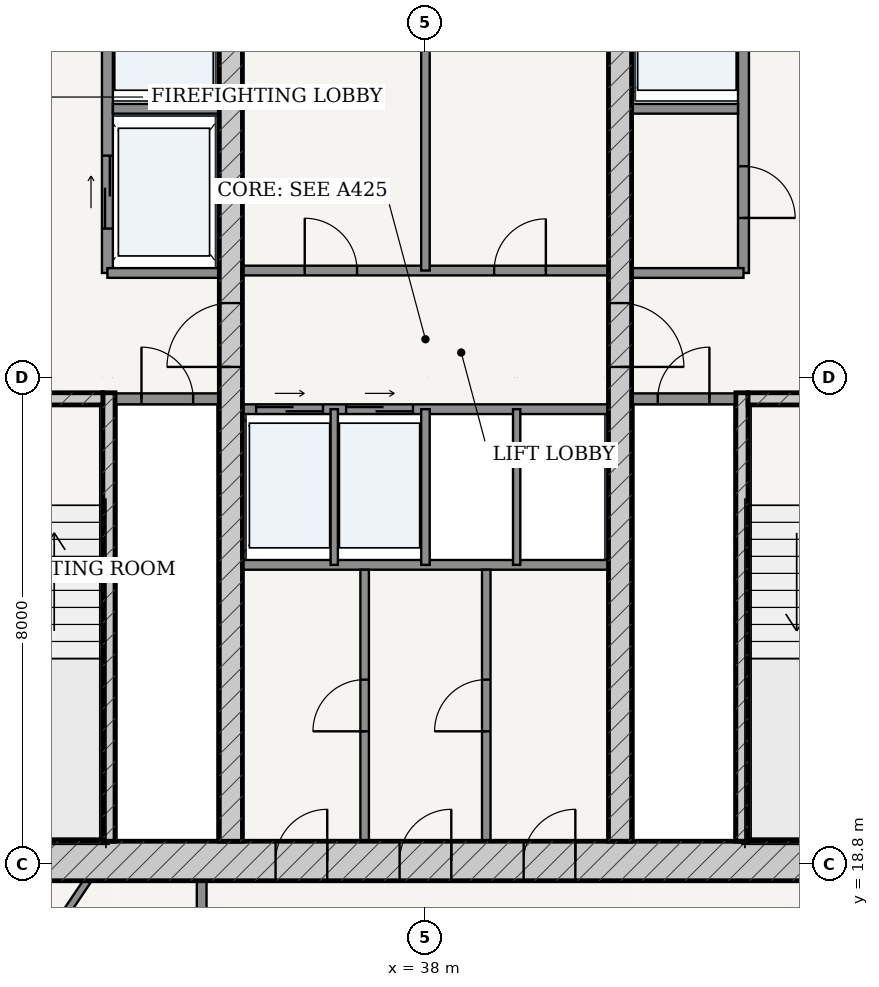
"""IFC4 building model, lengths in metres.
Left out: names, types, materials, properties, quantities, classifications, styles, units other than length and angle.
Written with IfcOpenShell. Run it as: python <this file> out.ifc"""

import sys

from ifc_helpers import new_model, si_unit, direction, frame, frame_2d, origin, place, context, subcontext, project, spatial, rectangle, extrude, source, transform, mapped, element, fill, save


model = new_model("IFC4")
c1 = context("Model", 3, precision=1e-05, world=origin(), true_north=direction((-0.2419218956, 0.970295726276)))
c2 = subcontext(c1, "Body", "Model", "MODEL_VIEW")
j1 = project(units=[si_unit("LENGTHUNIT", "METRE"), si_unit("PLANEANGLEUNIT", "RADIAN")], contexts=[c1])
p1 = place(None, origin())
s1 = spatial("IfcSite", under=j1, at=p1, CompositionType="ELEMENT")
p2 = place(p1, origin())
s2 = spatial("IfcBuilding", under=s1, at=p2, CompositionType="ELEMENT")
p3 = place(p2, frame((0.0, 0.0, 167.8)))
s3 = spatial("IfcBuildingStorey", under=s2, at=p3, CompositionType="ELEMENT", Elevation=167.8)
p4 = place(p3, frame((28.725, 18.85, 0.0), z_axis=(0.0, 0.0, 1.0), x_axis=(1.0, 0.0, 0.0)))
e1 = element("IfcWall", 1, at=p4, inside=s3, PredefinedType="SHEAR", context=c2, shape_type="SweptSolid", body=[
    extrude(rectangle(XDim=18.55, YDim=0.65, at=frame_2d((9.275, 0.0))), origin(), (0.0, 0.0, 1.0), 3.33),
])
p5 = place(p4, frame((6.81, 0.0, 0.0)))
e2 = element("IfcOpeningElement", 2, at=p5, cuts=e1, PredefinedType="OPENING", context=c2, shape_type="SweptSolid", body=[
    extrude(rectangle(XDim=0.85, YDim=2.1, at=frame_2d((0.425, 1.05))), frame((0.0, 0.335, 0.0), z_axis=(0.0, -1.0, 0.0), x_axis=(1.0, 0.0, 0.0)), (0.0, 0.0, 1.0), 0.67),
])
p6 = place(p4, frame((8.85, 0.0, 0.0)))
e3 = element("IfcOpeningElement", 3, at=p6, cuts=e1, PredefinedType="OPENING", context=c2, shape_type="SweptSolid", body=[
    extrude(rectangle(XDim=0.85, YDim=2.1, at=frame_2d((0.425, 1.05))), frame((0.0, 0.335, 0.0), z_axis=(0.0, -1.0, 0.0), x_axis=(1.0, 0.0, 0.0)), (0.0, 0.0, 1.0), 0.67),
])
p7 = place(p4, frame((10.89, 0.0, 0.0)))
e4 = element("IfcOpeningElement", 4, at=p7, cuts=e1, PredefinedType="OPENING", context=c2, shape_type="SweptSolid", body=[
    extrude(rectangle(XDim=0.85, YDim=2.1, at=frame_2d((0.425, 1.05))), frame((0.0, 0.335, 0.0), z_axis=(0.0, -1.0, 0.0), x_axis=(1.0, 0.0, 0.0)), (0.0, 0.0, 1.0), 0.67),
])
p8 = place(p3, frame((32.795, 19.175, 0.0), z_axis=(0.0, 0.0, 1.0), x_axis=(0.0, 1.0, 0.0)))
e5 = element("IfcWall", 5, at=p8, inside=s3, PredefinedType="SOLIDWALL", context=c2, shape_type="SweptSolid", body=[
    extrude(rectangle(XDim=7.375, YDim=0.2, at=frame_2d((3.688, 0.0))), origin(), (0.0, 0.0, 1.0), 3.33),
])
p9 = place(p3, frame((29.375, 26.45, 0.0), z_axis=(0.0, 0.0, 1.0), x_axis=(1.0, 0.0, 0.0)))
e6 = element("IfcWall", 6, at=p9, inside=s3, PredefinedType="SOLIDWALL", context=c2, shape_type="SweptSolid", body=[
    extrude(rectangle(XDim=3.32, YDim=0.2, at=frame_2d((1.66, 0.0))), origin(), (0.0, 0.0, 1.0), 3.33),
])
p10 = place(p9, frame((1.185, 0.0, 0.0)))
e7 = element("IfcOpeningElement", 7, at=p10, cuts=e6, PredefinedType="OPENING", context=c2, shape_type="SweptSolid", body=[
    extrude(rectangle(XDim=0.95, YDim=2.15, at=frame_2d((0.475, 1.075))), frame((0.0, 0.11, 0.0), z_axis=(0.0, -1.0, 0.0), x_axis=(1.0, 0.0, 0.0)), (0.0, 0.0, 1.0), 0.22),
])
p11 = place(p3, frame((43.205, 19.175, 0.0), z_axis=(0.0, 0.0, 1.0), x_axis=(0.0, 1.0, 0.0)))
e8 = element("IfcWall", 8, at=p11, inside=s3, PredefinedType="SOLIDWALL", context=c2, shape_type="SweptSolid", body=[
    extrude(rectangle(XDim=7.375, YDim=0.2, at=frame_2d((3.688, 0.0))), origin(), (0.0, 0.0, 1.0), 3.33),
])
p12 = place(p3, frame((43.305, 26.45, 0.0), z_axis=(0.0, 0.0, 1.0), x_axis=(1.0, 0.0, 0.0)))
e9 = element("IfcWall", 9, at=p12, inside=s3, PredefinedType="SOLIDWALL", context=c2, shape_type="SweptSolid", body=[
    extrude(rectangle(XDim=3.32, YDim=0.2, at=frame_2d((1.66, 0.0))), origin(), (0.0, 0.0, 1.0), 3.33),
])
p13 = place(p12, frame((1.185, 0.0, 0.0)))
e10 = element("IfcOpeningElement", 10, at=p13, cuts=e9, PredefinedType="OPENING", context=c2, shape_type="SweptSolid", body=[
    extrude(rectangle(XDim=0.95, YDim=2.15, at=frame_2d((0.475, 1.075))), frame((0.0, 0.11, 0.0), z_axis=(0.0, -1.0, 0.0), x_axis=(1.0, 0.0, 0.0)), (0.0, 0.0, 1.0), 0.22),
])
p14 = place(p3, frame((34.8, 19.175, 0.0), z_axis=(0.0, 0.0, 1.0), x_axis=(0.0, 1.0, 0.0)))
e11 = element("IfcWall", 11, at=p14, inside=s3, PredefinedType="SHEAR", context=c2, shape_type="SweptSolid", body=[
    extrude(rectangle(XDim=15.25, YDim=0.38, at=frame_2d((7.625, 0.0))), origin(), (0.0, 0.0, 1.0), 3.33),
])
p15 = place(p14, frame((7.8, 0.0, 0.0)))
e12 = element("IfcOpeningElement", 12, at=p15, cuts=e11, PredefinedType="OPENING", context=c2, shape_type="SweptSolid", body=[
    extrude(rectangle(XDim=1.05, YDim=2.15, at=frame_2d((0.525, 1.075))), frame((0.0, 0.2, 0.0), z_axis=(0.0, -1.0, 0.0), x_axis=(1.0, 0.0, 0.0)), (0.0, 0.0, 1.0), 0.4),
])
p16 = place(p3, frame((41.2, 19.175, 0.0), z_axis=(0.0, 0.0, 1.0), x_axis=(0.0, 1.0, 0.0)))
e13 = element("IfcWall", 13, at=p16, inside=s3, PredefinedType="SHEAR", context=c2, shape_type="SweptSolid", body=[
    extrude(rectangle(XDim=15.25, YDim=0.38, at=frame_2d((7.625, 0.0))), origin(), (0.0, 0.0, 1.0), 3.33),
])
p17 = place(p16, frame((7.8, 0.0, 0.0)))
e14 = element("IfcOpeningElement", 14, at=p17, cuts=e13, PredefinedType="OPENING", context=c2, shape_type="SweptSolid", body=[
    extrude(rectangle(XDim=1.05, YDim=2.15, at=frame_2d((0.525, 1.075))), frame((0.0, 0.2, 0.0), z_axis=(0.0, -1.0, 0.0), x_axis=(1.0, 0.0, 0.0)), (0.0, 0.0, 1.0), 0.4),
])
p18 = place(p3, frame((32.9, 26.45, 0.0), z_axis=(0.0, 0.0, 1.0), x_axis=(1.0, 0.0, 0.0)))
e15 = element("IfcWall", 15, at=p18, inside=s3, PredefinedType="PARTITIONING", context=c2, shape_type="SweptSolid", body=[
    extrude(rectangle(XDim=1.71, YDim=0.18, at=frame_2d((0.855, 0.0))), origin(), (0.0, 0.0, 1.0), 3.33),
])
p19 = place(p18, frame((0.43, 0.0, 0.0)))
e16 = element("IfcOpeningElement", 16, at=p19, cuts=e15, PredefinedType="OPENING", context=c2, shape_type="SweptSolid", body=[
    extrude(rectangle(XDim=0.85, YDim=2.1, at=frame_2d((0.425, 1.05))), frame((0.0, 0.1, 0.0), z_axis=(0.0, -1.0, 0.0), x_axis=(1.0, 0.0, 0.0)), (0.0, 0.0, 1.0), 0.2),
])
p20 = place(p3, frame((41.39, 26.45, 0.0), z_axis=(0.0, 0.0, 1.0), x_axis=(1.0, 0.0, 0.0)))
e17 = element("IfcWall", 17, at=p20, inside=s3, PredefinedType="PARTITIONING", context=c2, shape_type="SweptSolid", body=[
    extrude(rectangle(XDim=1.71, YDim=0.18, at=frame_2d((0.855, 0.0))), origin(), (0.0, 0.0, 1.0), 3.33),
])
p21 = place(p20, frame((0.43, 0.0, 0.0)))
e18 = element("IfcOpeningElement", 18, at=p21, cuts=e17, PredefinedType="OPENING", context=c2, shape_type="SweptSolid", body=[
    extrude(rectangle(XDim=0.85, YDim=2.1, at=frame_2d((0.425, 1.05))), frame((0.0, 0.1, 0.0), z_axis=(0.0, -1.0, 0.0), x_axis=(1.0, 0.0, 0.0)), (0.0, 0.0, 1.0), 0.2),
])
p22 = place(p3, frame((32.77, 28.52, 0.0), z_axis=(0.0, 0.0, 1.0), x_axis=(0.0, 1.0, 0.0)))
e19 = element("IfcWall", 19, at=p22, inside=s3, PredefinedType="PARTITIONING", context=c2, shape_type="SweptSolid", body=[
    extrude(rectangle(XDim=5.905, YDim=0.18, at=frame_2d((2.953, 0.0))), origin(), (0.0, 0.0, 1.0), 3.33),
])
p23 = place(p22, frame((3.655, 0.0, 0.0)))
e20 = element("IfcOpeningElement", 20, at=p23, cuts=e19, PredefinedType="OPENING", context=c2, shape_type="SweptSolid", body=[
    extrude(rectangle(XDim=1.15, YDim=2.2, at=frame_2d((0.575, 1.1))), frame((0.0, 0.1, 0.0), z_axis=(0.0, -1.0, 0.0), x_axis=(1.0, 0.0, 0.0)), (0.0, 0.0, 1.0), 0.2),
])
p24 = place(p22, frame((0.73, 0.0, 0.0)))
e21 = element("IfcOpeningElement", 21, at=p24, cuts=e19, PredefinedType="OPENING", context=c2, shape_type="SweptSolid", body=[
    extrude(rectangle(XDim=1.2, YDim=2.25, at=frame_2d((0.6, 1.125))), frame((0.0, 0.1, 0.0), z_axis=(0.0, -1.0, 0.0), x_axis=(1.0, 0.0, 0.0)), (0.0, 0.0, 1.0), 0.2),
])
p25 = place(p3, frame((32.86, 31.22, 0.0), z_axis=(0.0, 0.0, 1.0), x_axis=(1.0, 0.0, 0.0)))
e22 = element("IfcWall", 22, at=p25, inside=s3, PredefinedType="PARTITIONING", context=c2, shape_type="SweptSolid", body=[
    extrude(rectangle(XDim=1.75, YDim=0.16, at=frame_2d((0.875, 0.0))), origin(), (0.0, 0.0, 1.0), 3.33),
])
p26 = place(p3, frame((32.77, 28.52, 0.0), z_axis=(0.0, 0.0, 1.0), x_axis=(1.0, 0.0, 0.0)))
e23 = element("IfcWall", 23, at=p26, inside=s3, PredefinedType="PARTITIONING", context=c2, shape_type="SweptSolid", body=[
    extrude(rectangle(XDim=1.84, YDim=0.16, at=frame_2d((0.92, 0.0))), origin(), (0.0, 0.0, 1.0), 3.33),
])
p27 = place(p3, frame((43.23, 28.52, 0.0), z_axis=(0.0, 0.0, 1.0), x_axis=(0.0, 1.0, 0.0)))
e24 = element("IfcWall", 24, at=p27, inside=s3, PredefinedType="PARTITIONING", context=c2, shape_type="SweptSolid", body=[
    extrude(rectangle(XDim=5.905, YDim=0.18, at=frame_2d((2.953, 0.0))), origin(), (0.0, 0.0, 1.0), 3.33),
])
p28 = place(p27, frame((0.905, 0.0, 0.0)))
e25 = element("IfcOpeningElement", 25, at=p28, cuts=e24, PredefinedType="OPENING", context=c2, shape_type="SweptSolid", body=[
    extrude(rectangle(XDim=0.85, YDim=2.1, at=frame_2d((0.425, 1.05))), frame((0.0, 0.1, 0.0), z_axis=(0.0, -1.0, 0.0), x_axis=(1.0, 0.0, 0.0)), (0.0, 0.0, 1.0), 0.2),
])
p29 = place(p27, frame((3.655, 0.0, 0.0)))
e26 = element("IfcOpeningElement", 26, at=p29, cuts=e24, PredefinedType="OPENING", context=c2, shape_type="SweptSolid", body=[
    extrude(rectangle(XDim=1.15, YDim=2.2, at=frame_2d((0.575, 1.1))), frame((0.0, 0.1, 0.0), z_axis=(0.0, -1.0, 0.0), x_axis=(1.0, 0.0, 0.0)), (0.0, 0.0, 1.0), 0.2),
])
p30 = place(p3, frame((41.39, 31.22, 0.0), z_axis=(0.0, 0.0, 1.0), x_axis=(1.0, 0.0, 0.0)))
e27 = element("IfcWall", 27, at=p30, inside=s3, PredefinedType="PARTITIONING", context=c2, shape_type="SweptSolid", body=[
    extrude(rectangle(XDim=1.75, YDim=0.16, at=frame_2d((0.875, 0.0))), origin(), (0.0, 0.0, 1.0), 3.33),
])
p31 = place(p3, frame((41.39, 28.52, 0.0), z_axis=(0.0, 0.0, 1.0), x_axis=(1.0, 0.0, 0.0)))
e28 = element("IfcWall", 28, at=p31, inside=s3, PredefinedType="PARTITIONING", context=c2, shape_type="SweptSolid", body=[
    extrude(rectangle(XDim=1.84, YDim=0.16, at=frame_2d((0.92, 0.0))), origin(), (0.0, 0.0, 1.0), 3.33),
])
p32 = place(p3, frame((34.99, 28.56, 0.0), z_axis=(0.0, 0.0, 1.0), x_axis=(1.0, 0.0, 0.0)))
e29 = element("IfcWall", 29, at=p32, inside=s3, PredefinedType="PARTITIONING", context=c2, shape_type="SweptSolid", body=[
    extrude(rectangle(XDim=6.02, YDim=0.16, at=frame_2d((3.01, 0.0))), origin(), (0.0, 0.0, 1.0), 3.33),
])
p33 = place(p32, frame((1.025, 0.0, 0.0)))
e30 = element("IfcOpeningElement", 30, at=p33, cuts=e29, PredefinedType="OPENING", context=c2, shape_type="SweptSolid", body=[
    extrude(rectangle(XDim=0.86, YDim=2.1, at=frame_2d((0.43, 1.05))), frame((0.0, 0.09, 0.0), z_axis=(0.0, -1.0, 0.0), x_axis=(1.0, 0.0, 0.0)), (0.0, 0.0, 1.0), 0.18),
])
p34 = place(p32, frame((4.14, 0.0, 0.0)))
e31 = element("IfcOpeningElement", 31, at=p34, cuts=e29, PredefinedType="OPENING", context=c2, shape_type="SweptSolid", body=[
    extrude(rectangle(XDim=0.85, YDim=2.1, at=frame_2d((0.425, 1.05))), frame((0.0, 0.09, 0.0), z_axis=(0.0, -1.0, 0.0), x_axis=(1.0, 0.0, 0.0)), (0.0, 0.0, 1.0), 0.18),
])
p35 = place(p3, frame((38.0, 28.56, 0.0), z_axis=(0.0, 0.0, 1.0), x_axis=(0.0, 1.0, 0.0)))
e32 = element("IfcWall", 32, at=p35, inside=s3, PredefinedType="PARTITIONING", context=c2, shape_type="SweptSolid", body=[
    extrude(rectangle(XDim=5.865, YDim=0.14, at=frame_2d((2.933, 0.0))), origin(), (0.0, 0.0, 1.0), 3.33),
])
p36 = place(p3, frame((34.99, 26.28, 0.0), z_axis=(0.0, 0.0, 1.0), x_axis=(1.0, 0.0, 0.0)))
e33 = element("IfcWall", 33, at=p36, inside=s3, PredefinedType="PARTITIONING", context=c2, shape_type="SweptSolid", body=[
    extrude(rectangle(XDim=6.02, YDim=0.16, at=frame_2d((3.01, 0.0))), origin(), (0.0, 0.0, 1.0), 3.33),
])
p37 = place(p36, frame((0.225, 0.0, 0.0)))
e34 = element("IfcOpeningElement", 34, at=p37, cuts=e33, PredefinedType="OPENING", context=c2, shape_type="SweptSolid", body=[
    extrude(rectangle(XDim=1.1, YDim=2.2, at=frame_2d((0.55, 1.1))), frame((0.0, 0.09, 0.0), z_axis=(0.0, -1.0, 0.0), x_axis=(1.0, 0.0, 0.0)), (0.0, 0.0, 1.0), 0.18),
])
p38 = place(p36, frame((1.705, 0.0, 0.0)))
e35 = element("IfcOpeningElement", 35, at=p38, cuts=e33, PredefinedType="OPENING", context=c2, shape_type="SweptSolid", body=[
    extrude(rectangle(XDim=1.1, YDim=2.2, at=frame_2d((0.55, 1.1))), frame((0.0, 0.09, 0.0), z_axis=(0.0, -1.0, 0.0), x_axis=(1.0, 0.0, 0.0)), (0.0, 0.0, 1.0), 0.18),
])
p39 = place(p3, frame((34.99, 23.72, 0.0), z_axis=(0.0, 0.0, 1.0), x_axis=(1.0, 0.0, 0.0)))
e36 = element("IfcWall", 36, at=p39, inside=s3, PredefinedType="PARTITIONING", context=c2, shape_type="SweptSolid", body=[
    extrude(rectangle(XDim=6.02, YDim=0.16, at=frame_2d((3.01, 0.0))), origin(), (0.0, 0.0, 1.0), 3.33),
])
p40 = place(p3, frame((36.5, 23.72, 0.0), z_axis=(0.0, 0.0, 1.0), x_axis=(0.0, 1.0, 0.0)))
e37 = element("IfcWall", 37, at=p40, inside=s3, PredefinedType="PARTITIONING", context=c2, shape_type="SweptSolid", body=[
    extrude(rectangle(XDim=2.56, YDim=0.12, at=frame_2d((1.28, 0.0))), origin(), (0.0, 0.0, 1.0), 3.33),
])
p41 = place(p3, frame((38.0, 23.72, 0.0), z_axis=(0.0, 0.0, 1.0), x_axis=(0.0, 1.0, 0.0)))
e38 = element("IfcWall", 38, at=p41, inside=s3, PredefinedType="PARTITIONING", context=c2, shape_type="SweptSolid", body=[
    extrude(rectangle(XDim=2.56, YDim=0.14, at=frame_2d((1.28, 0.0))), origin(), (0.0, 0.0, 1.0), 3.33),
])
p42 = place(p3, frame((39.5, 23.72, 0.0), z_axis=(0.0, 0.0, 1.0), x_axis=(0.0, 1.0, 0.0)))
e39 = element("IfcWall", 39, at=p42, inside=s3, PredefinedType="PARTITIONING", context=c2, shape_type="SweptSolid", body=[
    extrude(rectangle(XDim=2.56, YDim=0.12, at=frame_2d((1.28, 0.0))), origin(), (0.0, 0.0, 1.0), 3.33),
])
p43 = place(p3, frame((37.0, 19.175, 0.0), z_axis=(0.0, 0.0, 1.0), x_axis=(0.0, 1.0, 0.0)))
e40 = element("IfcWall", 40, at=p43, inside=s3, PredefinedType="PARTITIONING", context=c2, shape_type="SweptSolid", body=[
    extrude(rectangle(XDim=4.465, YDim=0.14, at=frame_2d((2.232, 0.0))), origin(), (0.0, 0.0, 1.0), 3.33),
])
p44 = place(p43, frame((1.808, 0.0, 0.0)))
e41 = element("IfcOpeningElement", 41, at=p44, cuts=e40, PredefinedType="OPENING", context=c2, shape_type="SweptSolid", body=[
    extrude(rectangle(XDim=0.85, YDim=2.1, at=frame_2d((0.425, 1.05))), frame((0.0, 0.08, 0.0), z_axis=(0.0, -1.0, 0.0), x_axis=(1.0, 0.0, 0.0)), (0.0, 0.0, 1.0), 0.16),
])
p45 = place(p3, frame((39.0, 19.175, 0.0), z_axis=(0.0, 0.0, 1.0), x_axis=(0.0, 1.0, 0.0)))
e42 = element("IfcWall", 42, at=p45, inside=s3, PredefinedType="PARTITIONING", context=c2, shape_type="SweptSolid", body=[
    extrude(rectangle(XDim=4.465, YDim=0.14, at=frame_2d((2.232, 0.0))), origin(), (0.0, 0.0, 1.0), 3.33),
])
p46 = place(p45, frame((1.808, 0.0, 0.0)))
e43 = element("IfcOpeningElement", 43, at=p46, cuts=e42, PredefinedType="OPENING", context=c2, shape_type="SweptSolid", body=[
    extrude(rectangle(XDim=0.85, YDim=2.1, at=frame_2d((0.425, 1.05))), frame((0.0, 0.08, 0.0), z_axis=(0.0, -1.0, 0.0), x_axis=(1.0, 0.0, 0.0)), (0.0, 0.0, 1.0), 0.16),
])
p47 = place(p3, frame((34.32, 16.675, 0.0), z_axis=(0.0, 0.0, 1.0), x_axis=(0.0, 1.0, 0.0)))
e44 = element("IfcWall", 44, at=p47, inside=s3, PredefinedType="PARTITIONING", context=c2, shape_type="SweptSolid", body=[
    extrude(rectangle(XDim=1.85, YDim=0.16, at=frame_2d((0.925, 0.0))), origin(), (0.0, 0.0, 1.0), 3.33),
])
p48 = place(p3, frame((32.441, 18.525, 0.0), z_axis=(0.0, 0.0, 1.0), x_axis=(-0.557594690071, -0.830113342625, 0.0)))
e45 = element("IfcWall", 45, at=p48, inside=s3, PredefinedType="PARTITIONING", context=c2, shape_type="SweptSolid", body=[
    extrude(rectangle(XDim=3.13, YDim=0.12, at=frame_2d((1.565, 0.0))), origin(), (0.0, 0.0, 1.0), 3.33),
])
p49 = place(p48, frame((1.135, 0.0, 0.0)))
e46 = element("IfcOpeningElement", 46, at=p49, cuts=e45, PredefinedType="OPENING", context=c2, shape_type="SweptSolid", body=[
    extrude(rectangle(XDim=0.86, YDim=2.15, at=frame_2d((0.43, 1.075))), frame((0.0, 0.07, 0.0), z_axis=(0.0, -1.0, 0.0), x_axis=(1.0, 0.0, 0.0)), (0.0, 0.0, 1.0), 0.14),
])
m1 = source(origin(), c2, "Body", "SweptSolid", [
    extrude(rectangle(XDim=1.05, YDim=2.15, at=frame_2d((0.525, 1.075))), frame((0.0, 0.025, 0.0), z_axis=(0.0, -1.0, 0.0), x_axis=(1.0, 0.0, 0.0)), (0.0, 0.0, 1.0), 0.05),
])
p50 = place(p15, origin())
e47 = element("IfcDoor", 47, at=p50, inside=s3, OperationType="SINGLE_SWING_LEFT", PredefinedType="DOOR", context=c2, shape_type="MappedRepresentation", body=[
    mapped(m1, transform((0.0, 0.0, 0.0), scale=1.0)),
])
fill(e12, e47)
p51 = place(p17, frame((1.05, 0.0, 0.0), z_axis=(0.0, 0.0, 1.0), x_axis=(-1.0, 0.0, 0.0)))
e48 = element("IfcDoor", 48, at=p51, inside=s3, OperationType="SINGLE_SWING_RIGHT", PredefinedType="DOOR", context=c2, shape_type="MappedRepresentation", body=[
    mapped(m1, transform((0.0, 0.0, 0.0), scale=1.0)),
])
fill(e14, e48)
m2 = source(origin(), c2, "Body", "SweptSolid", [
    extrude(rectangle(XDim=0.85, YDim=2.1, at=frame_2d((0.425, 1.05))), frame((0.0, 0.025, 0.0), z_axis=(0.0, -1.0, 0.0), x_axis=(1.0, 0.0, 0.0)), (0.0, 0.0, 1.0), 0.05),
])
p52 = place(p19, origin())
e49 = element("IfcDoor", 49, at=p52, inside=s3, OperationType="SINGLE_SWING_LEFT", PredefinedType="DOOR", context=c2, shape_type="MappedRepresentation", body=[
    mapped(m2, transform((0.0, 0.0, 0.0), scale=1.0)),
])
fill(e16, e49)
p53 = place(p21, origin())
e50 = element("IfcDoor", 50, at=p53, inside=s3, OperationType="SINGLE_SWING_RIGHT", PredefinedType="DOOR", context=c2, shape_type="MappedRepresentation", body=[
    mapped(m2, transform((0.0, 0.0, 0.0), scale=1.0)),
])
fill(e18, e50)
p54 = place(p28, frame((0.85, 0.0, 0.0), z_axis=(0.0, 0.0, 1.0), x_axis=(-1.0, 0.0, 0.0)))
e51 = element("IfcDoor", 51, at=p54, inside=s3, OperationType="SINGLE_SWING_RIGHT", PredefinedType="DOOR", context=c2, shape_type="MappedRepresentation", body=[
    mapped(m2, transform((0.0, 0.0, 0.0), scale=1.0)),
])
fill(e25, e51)
m3 = source(origin(), c2, "Body", "SweptSolid", [
    extrude(rectangle(XDim=0.86, YDim=2.1, at=frame_2d((0.43, 1.05))), frame((0.0, 0.025, 0.0), z_axis=(0.0, -1.0, 0.0), x_axis=(1.0, 0.0, 0.0)), (0.0, 0.0, 1.0), 0.05),
])
p55 = place(p33, origin())
e52 = element("IfcDoor", 52, at=p55, inside=s3, OperationType="SINGLE_SWING_LEFT", PredefinedType="DOOR", context=c2, shape_type="MappedRepresentation", body=[
    mapped(m3, transform((0.0, 0.0, 0.0), scale=1.0)),
])
fill(e30, e52)
p56 = place(p34, origin())
e53 = element("IfcDoor", 53, at=p56, inside=s3, OperationType="SINGLE_SWING_RIGHT", PredefinedType="DOOR", context=c2, shape_type="MappedRepresentation", body=[
    mapped(m2, transform((0.0, 0.0, 0.0), scale=1.0)),
])
fill(e31, e53)
p57 = place(p5, origin())
e54 = element("IfcDoor", 54, at=p57, inside=s3, OperationType="SINGLE_SWING_RIGHT", PredefinedType="DOOR", context=c2, shape_type="MappedRepresentation", body=[
    mapped(m2, transform((0.0, 0.0, 0.0), scale=1.0)),
])
fill(e2, e54)
p58 = place(p6, origin())
e55 = element("IfcDoor", 55, at=p58, inside=s3, OperationType="SINGLE_SWING_RIGHT", PredefinedType="DOOR", context=c2, shape_type="MappedRepresentation", body=[
    mapped(m2, transform((0.0, 0.0, 0.0), scale=1.0)),
])
fill(e3, e55)
p59 = place(p7, origin())
e56 = element("IfcDoor", 56, at=p59, inside=s3, OperationType="SINGLE_SWING_RIGHT", PredefinedType="DOOR", context=c2, shape_type="MappedRepresentation", body=[
    mapped(m2, transform((0.0, 0.0, 0.0), scale=1.0)),
])
fill(e4, e56)
p60 = place(p44, origin())
e57 = element("IfcDoor", 57, at=p60, inside=s3, OperationType="SINGLE_SWING_LEFT", PredefinedType="DOOR", context=c2, shape_type="MappedRepresentation", body=[
    mapped(m2, transform((0.0, 0.0, 0.0), scale=1.0)),
])
fill(e41, e57)
p61 = place(p46, origin())
e58 = element("IfcDoor", 58, at=p61, inside=s3, OperationType="SINGLE_SWING_LEFT", PredefinedType="DOOR", context=c2, shape_type="MappedRepresentation", body=[
    mapped(m2, transform((0.0, 0.0, 0.0), scale=1.0)),
])
fill(e43, e58)
m4 = source(origin(), c2, "Body", "SweptSolid", [
    extrude(rectangle(XDim=1.2, YDim=2.25, at=frame_2d((0.6, 1.125))), frame((0.0, 0.025, 0.0), z_axis=(0.0, -1.0, 0.0), x_axis=(1.0, 0.0, 0.0)), (0.0, 0.0, 1.0), 0.05),
])
p62 = place(p24, origin())
e59 = element("IfcDoor", 59, at=p62, inside=s3, OperationType="DOUBLE_DOOR_SLIDING", PredefinedType="DOOR", context=c2, shape_type="MappedRepresentation", body=[
    mapped(m4, transform((0.0, 0.0, 0.0), scale=1.0)),
])
fill(e21, e59)
m5 = source(origin(), c2, "Body", "SweptSolid", [
    extrude(rectangle(XDim=1.1, YDim=2.2, at=frame_2d((0.55, 1.1))), frame((0.0, 0.025, 0.0), z_axis=(0.0, -1.0, 0.0), x_axis=(1.0, 0.0, 0.0)), (0.0, 0.0, 1.0), 0.05),
])
p63 = place(p37, origin())
e60 = element("IfcDoor", 60, at=p63, inside=s3, OperationType="DOUBLE_DOOR_SLIDING", PredefinedType="DOOR", context=c2, shape_type="MappedRepresentation", body=[
    mapped(m5, transform((0.0, 0.0, 0.0), scale=1.0)),
])
fill(e34, e60)
p64 = place(p38, origin())
e61 = element("IfcDoor", 61, at=p64, inside=s3, OperationType="DOUBLE_DOOR_SLIDING", PredefinedType="DOOR", context=c2, shape_type="MappedRepresentation", body=[
    mapped(m5, transform((0.0, 0.0, 0.0), scale=1.0)),
])
fill(e35, e61)
save(model, sys.argv[1])
